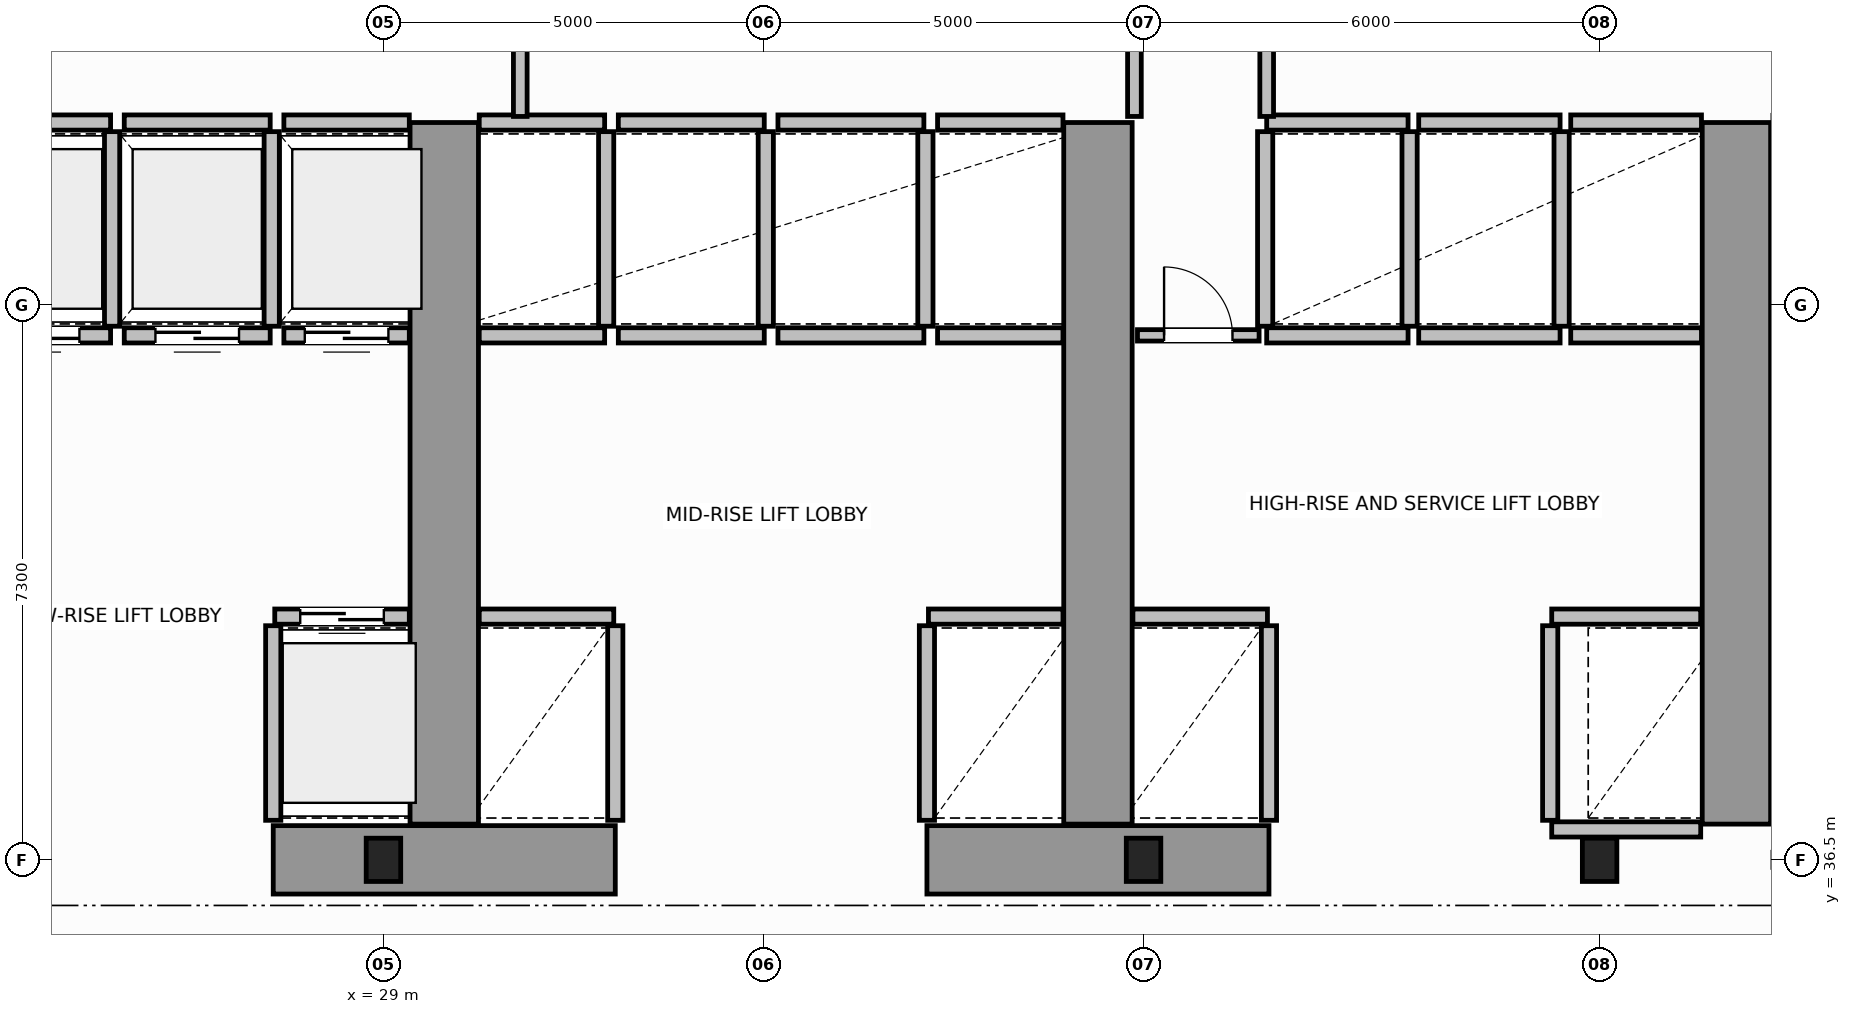
"""IFC4 building model, lengths in metres.
Left out: names, types, materials, properties, quantities, classifications, styles, units other than length and angle.
Written with IfcOpenShell. Run it as: python <this file> out.ifc"""

import sys

from ifc_helpers import new_model, si_unit, direction, frame, frame_2d, origin, origin_2d, place, context, subcontext, project, spatial, rectangle, i_section, extrude, source, transform, mapped, element, fill, save


model = new_model("IFC4")
c1 = context("Model", 3, precision=1e-05, world=origin(), true_north=direction((0.0, 1.0)))
c2 = subcontext(c1, "Body", "Model", "MODEL_VIEW")
j1 = project(units=[si_unit("LENGTHUNIT", "METRE"), si_unit("PLANEANGLEUNIT", "RADIAN")], contexts=[c1])
p1 = place(None, origin())
s1 = spatial("IfcSite", under=j1, at=p1, CompositionType="ELEMENT")
p2 = place(p1, origin())
s2 = spatial("IfcBuilding", under=s1, at=p2, CompositionType="ELEMENT")
p3 = place(p2, frame((0.0, 0.0, 60.6)))
s3 = spatial("IfcBuildingStorey", under=s2, at=p3, CompositionType="ELEMENT", Elevation=60.6)
m1 = source(origin(), c2, "Body", "SweptSolid", [
    extrude(i_section(OverallWidth=0.454, OverallDepth=0.569, WebThickness=0.078, FlangeThickness=0.08, FilletRadius=0.015, at=origin_2d()), origin(), (0.0, 0.0, 1.0), 3.8),
])
for number, where, z_axis, x_axis in (
    (1, (29.0, 36.5, 0.0), (0.0, 0.0, 1.0), (1.0, 0.0, 0.0)),
    (2, (39.0, 36.5, 0.0), (0.0, 0.0, 1.0), (1.0, 0.0, 0.0)),
    (3, (45.0, 36.5, 0.0), (0.0, 0.0, 1.0), (1.0, 0.0, 0.0)),
):
    element("IfcColumn", number, at=place(p3, frame(where, z_axis=z_axis, x_axis=x_axis)), inside=s3, PredefinedType="COLUMN", context=c2, shape_type="MappedRepresentation", body=[
        mapped(m1, transform((0.0, 0.0, 0.0), scale=1.0)),
    ])
for number, where, z_axis, x_axis in (
    (4, (27.55, 36.5, 0.0), (0.0, 0.0, 1.0), (1.0, 0.0, 0.0)),
    (5, (36.15, 36.5, 0.0), (0.0, 0.0, 1.0), (1.0, 0.0, 0.0)),
):
    element("IfcWall", number, at=place(p3, frame(where, z_axis=z_axis, x_axis=x_axis)), inside=s3, PredefinedType="SHEAR", context=c2, shape_type="SweptSolid", body=[
        extrude(rectangle(XDim=4.5, YDim=0.9, at=frame_2d((2.25, 0.0))), origin(), (0.0, 0.0, 1.0), 3.8),
    ])
for number, where, z_axis, x_axis in (
    (6, (29.8, 36.97, 0.0), (0.0, 0.0, 1.0), (0.0, 1.0, 0.0)),
    (7, (38.4, 36.97, 0.0), (0.0, 0.0, 1.0), (0.0, 1.0, 0.0)),
    (8, (46.8, 36.97, 0.0), (0.0, 0.0, 1.0), (0.0, 1.0, 0.0)),
):
    element("IfcWall", number, at=place(p3, frame(where, z_axis=z_axis, x_axis=x_axis)), inside=s3, PredefinedType="SHEAR", context=c2, shape_type="SweptSolid", body=[
        extrude(rectangle(XDim=9.23, YDim=0.9, at=frame_2d((4.615, 0.0))), origin(), (0.0, 0.0, 1.0), 3.8),
    ])
p4 = place(p3, frame((27.57, 39.7, 0.0), z_axis=(0.0, 0.0, 1.0), x_axis=(1.0, 0.0, 0.0)))
e9 = element("IfcWall", 9, at=p4, inside=s3, PredefinedType="SOLIDWALL", context=c2, shape_type="SweptSolid", body=[
    extrude(rectangle(XDim=1.77, YDim=0.2, at=frame_2d((0.885, 0.0))), origin(), (0.0, 0.0, 1.0), 3.58),
])
p5 = place(p4, frame((0.335, 0.0, 0.0)))
e10 = element("IfcOpeningElement", 10, at=p5, cuts=e9, PredefinedType="OPENING", context=c2, shape_type="SweptSolid", body=[
    extrude(rectangle(XDim=1.1, YDim=2.15, at=frame_2d((0.55, 1.075))), frame((0.0, 0.11, 0.0), z_axis=(0.0, -1.0, 0.0), x_axis=(1.0, 0.0, 0.0)), (0.0, 0.0, 1.0), 0.22),
])
p6 = place(p3, frame((27.55, 37.02, 0.0), z_axis=(0.0, 0.0, 1.0), x_axis=(0.0, 1.0, 0.0)))
e11 = element("IfcWall", 11, at=p6, inside=s3, PredefinedType="SOLIDWALL", context=c2, shape_type="SweptSolid", body=[
    extrude(rectangle(XDim=2.56, YDim=0.2, at=frame_2d((1.28, 0.0))), origin(), (0.0, 0.0, 1.0), 3.58),
])
p7 = place(p3, frame((23.49, 43.4, 0.0), z_axis=(0.0, 0.0, 1.0), x_axis=(1.0, 0.0, 0.0)))
e12 = element("IfcWall", 12, at=p7, inside=s3, PredefinedType="SOLIDWALL", context=c2, shape_type="SweptSolid", body=[
    extrude(rectangle(XDim=1.92, YDim=0.2, at=frame_2d((0.96, 0.0))), origin(), (0.0, 0.0, 1.0), 3.58),
])
p8 = place(p7, frame((0.41, 0.0, 0.0)))
e13 = element("IfcOpeningElement", 13, at=p8, cuts=e12, PredefinedType="OPENING", context=c2, shape_type="SweptSolid", body=[
    extrude(rectangle(XDim=1.1, YDim=2.15, at=frame_2d((0.55, 1.075))), frame((0.0, 0.11, 0.0), z_axis=(0.0, -1.0, 0.0), x_axis=(1.0, 0.0, 0.0)), (0.0, 0.0, 1.0), 0.22),
])
p9 = place(p3, frame((23.49, 46.2, 0.0), z_axis=(0.0, 0.0, 1.0), x_axis=(1.0, 0.0, 0.0)))
e14 = element("IfcWall", 14, at=p9, inside=s3, PredefinedType="SOLIDWALL", context=c2, shape_type="SweptSolid", body=[
    extrude(rectangle(XDim=1.92, YDim=0.2, at=frame_2d((0.96, 0.0))), origin(), (0.0, 0.0, 1.0), 3.58),
])
p10 = place(p3, frame((25.43, 43.52, 0.0), z_axis=(0.0, 0.0, 1.0), x_axis=(0.0, 1.0, 0.0)))
e15 = element("IfcWall", 15, at=p10, inside=s3, PredefinedType="SOLIDWALL", context=c2, shape_type="SweptSolid", body=[
    extrude(rectangle(XDim=2.56, YDim=0.2, at=frame_2d((1.28, 0.0))), origin(), (0.0, 0.0, 1.0), 3.58),
])
p11 = place(p3, frame((25.59, 43.4, 0.0), z_axis=(0.0, 0.0, 1.0), x_axis=(1.0, 0.0, 0.0)))
e16 = element("IfcWall", 16, at=p11, inside=s3, PredefinedType="SOLIDWALL", context=c2, shape_type="SweptSolid", body=[
    extrude(rectangle(XDim=1.92, YDim=0.2, at=frame_2d((0.96, 0.0))), origin(), (0.0, 0.0, 1.0), 3.58),
])
p12 = place(p11, frame((0.41, 0.0, 0.0)))
e17 = element("IfcOpeningElement", 17, at=p12, cuts=e16, PredefinedType="OPENING", context=c2, shape_type="SweptSolid", body=[
    extrude(rectangle(XDim=1.1, YDim=2.15, at=frame_2d((0.55, 1.075))), frame((0.0, 0.11, 0.0), z_axis=(0.0, -1.0, 0.0), x_axis=(1.0, 0.0, 0.0)), (0.0, 0.0, 1.0), 0.22),
])
p13 = place(p3, frame((25.59, 46.2, 0.0), z_axis=(0.0, 0.0, 1.0), x_axis=(1.0, 0.0, 0.0)))
e18 = element("IfcWall", 18, at=p13, inside=s3, PredefinedType="SOLIDWALL", context=c2, shape_type="SweptSolid", body=[
    extrude(rectangle(XDim=1.92, YDim=0.2, at=frame_2d((0.96, 0.0))), origin(), (0.0, 0.0, 1.0), 3.58),
])
p14 = place(p3, frame((27.53, 43.52, 0.0), z_axis=(0.0, 0.0, 1.0), x_axis=(0.0, 1.0, 0.0)))
e19 = element("IfcWall", 19, at=p14, inside=s3, PredefinedType="SOLIDWALL", context=c2, shape_type="SweptSolid", body=[
    extrude(rectangle(XDim=2.56, YDim=0.2, at=frame_2d((1.28, 0.0))), origin(), (0.0, 0.0, 1.0), 3.58),
])
p15 = place(p3, frame((27.69, 43.4, 0.0), z_axis=(0.0, 0.0, 1.0), x_axis=(1.0, 0.0, 0.0)))
e20 = element("IfcWall", 20, at=p15, inside=s3, PredefinedType="SOLIDWALL", context=c2, shape_type="SweptSolid", body=[
    extrude(rectangle(XDim=1.65, YDim=0.2, at=frame_2d((0.825, 0.0))), origin(), (0.0, 0.0, 1.0), 3.58),
])
p16 = place(p15, frame((0.275, 0.0, 0.0)))
e21 = element("IfcOpeningElement", 21, at=p16, cuts=e20, PredefinedType="OPENING", context=c2, shape_type="SweptSolid", body=[
    extrude(rectangle(XDim=1.1, YDim=2.15, at=frame_2d((0.55, 1.075))), frame((0.0, 0.11, 0.0), z_axis=(0.0, -1.0, 0.0), x_axis=(1.0, 0.0, 0.0)), (0.0, 0.0, 1.0), 0.22),
])
p17 = place(p3, frame((27.69, 46.2, 0.0), z_axis=(0.0, 0.0, 1.0), x_axis=(1.0, 0.0, 0.0)))
e22 = element("IfcWall", 22, at=p17, inside=s3, PredefinedType="SOLIDWALL", context=c2, shape_type="SweptSolid", body=[
    extrude(rectangle(XDim=1.65, YDim=0.2, at=frame_2d((0.825, 0.0))), origin(), (0.0, 0.0, 1.0), 3.58),
])
p18 = place(p3, frame((30.26, 39.7, 0.0), z_axis=(0.0, 0.0, 1.0), x_axis=(1.0, 0.0, 0.0)))
e23 = element("IfcWall", 23, at=p18, inside=s3, PredefinedType="SOLIDWALL", context=c2, shape_type="SweptSolid", body=[
    extrude(rectangle(XDim=1.77, YDim=0.2, at=frame_2d((0.885, 0.0))), origin(), (0.0, 0.0, 1.0), 3.58),
])
p19 = place(p3, frame((32.05, 37.02, 0.0), z_axis=(0.0, 0.0, 1.0), x_axis=(0.0, 1.0, 0.0)))
e24 = element("IfcWall", 24, at=p19, inside=s3, PredefinedType="SOLIDWALL", context=c2, shape_type="SweptSolid", body=[
    extrude(rectangle(XDim=2.56, YDim=0.2, at=frame_2d((1.28, 0.0))), origin(), (0.0, 0.0, 1.0), 3.58),
])
p20 = place(p3, frame((36.17, 39.7, 0.0), z_axis=(0.0, 0.0, 1.0), x_axis=(1.0, 0.0, 0.0)))
e25 = element("IfcWall", 25, at=p20, inside=s3, PredefinedType="SOLIDWALL", context=c2, shape_type="SweptSolid", body=[
    extrude(rectangle(XDim=1.77, YDim=0.2, at=frame_2d((0.885, 0.0))), origin(), (0.0, 0.0, 1.0), 3.58),
])
p21 = place(p3, frame((36.15, 37.02, 0.0), z_axis=(0.0, 0.0, 1.0), x_axis=(0.0, 1.0, 0.0)))
e26 = element("IfcWall", 26, at=p21, inside=s3, PredefinedType="SOLIDWALL", context=c2, shape_type="SweptSolid", body=[
    extrude(rectangle(XDim=2.56, YDim=0.2, at=frame_2d((1.28, 0.0))), origin(), (0.0, 0.0, 1.0), 3.58),
])
for number, where, z_axis, x_axis in (
    (27, (30.26, 43.4, 0.0), (0.0, 0.0, 1.0), (1.0, 0.0, 0.0)),
    (28, (30.26, 46.2, 0.0), (0.0, 0.0, 1.0), (1.0, 0.0, 0.0)),
):
    element("IfcWall", number, at=place(p3, frame(where, z_axis=z_axis, x_axis=x_axis)), inside=s3, PredefinedType="SOLIDWALL", context=c2, shape_type="SweptSolid", body=[
        extrude(rectangle(XDim=1.65, YDim=0.2, at=frame_2d((0.825, 0.0))), origin(), (0.0, 0.0, 1.0), 3.58),
    ])
p22 = place(p3, frame((31.93, 43.52, 0.0), z_axis=(0.0, 0.0, 1.0), x_axis=(0.0, 1.0, 0.0)))
e29 = element("IfcWall", 29, at=p22, inside=s3, PredefinedType="SOLIDWALL", context=c2, shape_type="SweptSolid", body=[
    extrude(rectangle(XDim=2.56, YDim=0.2, at=frame_2d((1.28, 0.0))), origin(), (0.0, 0.0, 1.0), 3.58),
])
for number, where, z_axis, x_axis in (
    (30, (32.09, 43.4, 0.0), (0.0, 0.0, 1.0), (1.0, 0.0, 0.0)),
    (31, (32.09, 46.2, 0.0), (0.0, 0.0, 1.0), (1.0, 0.0, 0.0)),
):
    element("IfcWall", number, at=place(p3, frame(where, z_axis=z_axis, x_axis=x_axis)), inside=s3, PredefinedType="SOLIDWALL", context=c2, shape_type="SweptSolid", body=[
        extrude(rectangle(XDim=1.92, YDim=0.2, at=frame_2d((0.96, 0.0))), origin(), (0.0, 0.0, 1.0), 3.58),
    ])
p23 = place(p3, frame((34.03, 43.52, 0.0), z_axis=(0.0, 0.0, 1.0), x_axis=(0.0, 1.0, 0.0)))
e32 = element("IfcWall", 32, at=p23, inside=s3, PredefinedType="SOLIDWALL", context=c2, shape_type="SweptSolid", body=[
    extrude(rectangle(XDim=2.56, YDim=0.2, at=frame_2d((1.28, 0.0))), origin(), (0.0, 0.0, 1.0), 3.58),
])
for number, where, z_axis, x_axis in (
    (33, (34.19, 43.4, 0.0), (0.0, 0.0, 1.0), (1.0, 0.0, 0.0)),
    (34, (34.19, 46.2, 0.0), (0.0, 0.0, 1.0), (1.0, 0.0, 0.0)),
):
    element("IfcWall", number, at=place(p3, frame(where, z_axis=z_axis, x_axis=x_axis)), inside=s3, PredefinedType="SOLIDWALL", context=c2, shape_type="SweptSolid", body=[
        extrude(rectangle(XDim=1.92, YDim=0.2, at=frame_2d((0.96, 0.0))), origin(), (0.0, 0.0, 1.0), 3.58),
    ])
p24 = place(p3, frame((36.13, 43.52, 0.0), z_axis=(0.0, 0.0, 1.0), x_axis=(0.0, 1.0, 0.0)))
e35 = element("IfcWall", 35, at=p24, inside=s3, PredefinedType="SOLIDWALL", context=c2, shape_type="SweptSolid", body=[
    extrude(rectangle(XDim=2.56, YDim=0.2, at=frame_2d((1.28, 0.0))), origin(), (0.0, 0.0, 1.0), 3.58),
])
for number, where, z_axis, x_axis in (
    (36, (36.29, 43.4, 0.0), (0.0, 0.0, 1.0), (1.0, 0.0, 0.0)),
    (37, (36.29, 46.2, 0.0), (0.0, 0.0, 1.0), (1.0, 0.0, 0.0)),
):
    element("IfcWall", number, at=place(p3, frame(where, z_axis=z_axis, x_axis=x_axis)), inside=s3, PredefinedType="SOLIDWALL", context=c2, shape_type="SweptSolid", body=[
        extrude(rectangle(XDim=1.65, YDim=0.2, at=frame_2d((0.825, 0.0))), origin(), (0.0, 0.0, 1.0), 3.58),
    ])
p25 = place(p3, frame((38.86, 39.7, 0.0), z_axis=(0.0, 0.0, 1.0), x_axis=(1.0, 0.0, 0.0)))
e38 = element("IfcWall", 38, at=p25, inside=s3, PredefinedType="SOLIDWALL", context=c2, shape_type="SweptSolid", body=[
    extrude(rectangle(XDim=1.77, YDim=0.2, at=frame_2d((0.885, 0.0))), origin(), (0.0, 0.0, 1.0), 3.58),
])
p26 = place(p3, frame((40.65, 37.02, 0.0), z_axis=(0.0, 0.0, 1.0), x_axis=(0.0, 1.0, 0.0)))
e39 = element("IfcWall", 39, at=p26, inside=s3, PredefinedType="SOLIDWALL", context=c2, shape_type="SweptSolid", body=[
    extrude(rectangle(XDim=2.56, YDim=0.2, at=frame_2d((1.28, 0.0))), origin(), (0.0, 0.0, 1.0), 3.58),
])
p27 = place(p3, frame((44.37, 39.7, 0.0), z_axis=(0.0, 0.0, 1.0), x_axis=(1.0, 0.0, 0.0)))
e40 = element("IfcWall", 40, at=p27, inside=s3, PredefinedType="SOLIDWALL", context=c2, shape_type="SweptSolid", body=[
    extrude(rectangle(XDim=1.96, YDim=0.2, at=frame_2d((0.98, 0.0))), origin(), (0.0, 0.0, 1.0), 3.58),
])
p28 = place(p3, frame((44.37, 36.9, 0.0), z_axis=(0.0, 0.0, 1.0), x_axis=(1.0, 0.0, 0.0)))
e41 = element("IfcWall", 41, at=p28, inside=s3, PredefinedType="SOLIDWALL", context=c2, shape_type="SweptSolid", body=[
    extrude(rectangle(XDim=1.96, YDim=0.2, at=frame_2d((0.98, 0.0))), origin(), (0.0, 0.0, 1.0), 2.37),
])
p29 = place(p3, frame((44.35, 37.02, 0.0), z_axis=(0.0, 0.0, 1.0), x_axis=(0.0, 1.0, 0.0)))
e42 = element("IfcWall", 42, at=p29, inside=s3, PredefinedType="SOLIDWALL", context=c2, shape_type="SweptSolid", body=[
    extrude(rectangle(XDim=2.56, YDim=0.2, at=frame_2d((1.28, 0.0))), origin(), (0.0, 0.0, 1.0), 3.58),
])
for number, where, z_axis, x_axis in (
    (43, (40.62, 43.4, 0.0), (0.0, 0.0, 1.0), (1.0, 0.0, 0.0)),
    (44, (40.62, 46.2, 0.0), (0.0, 0.0, 1.0), (1.0, 0.0, 0.0)),
):
    element("IfcWall", number, at=place(p3, frame(where, z_axis=z_axis, x_axis=x_axis)), inside=s3, PredefinedType="SOLIDWALL", context=c2, shape_type="SweptSolid", body=[
        extrude(rectangle(XDim=1.86, YDim=0.2, at=frame_2d((0.93, 0.0))), origin(), (0.0, 0.0, 1.0), 3.58),
    ])
for number, where, z_axis, x_axis in (
    (45, (40.6, 43.52, 0.0), (0.0, 0.0, 1.0), (0.0, 1.0, 0.0)),
    (46, (42.5, 43.52, 0.0), (0.0, 0.0, 1.0), (0.0, 1.0, 0.0)),
):
    element("IfcWall", number, at=place(p3, frame(where, z_axis=z_axis, x_axis=x_axis)), inside=s3, PredefinedType="SOLIDWALL", context=c2, shape_type="SweptSolid", body=[
        extrude(rectangle(XDim=2.56, YDim=0.2, at=frame_2d((1.28, 0.0))), origin(), (0.0, 0.0, 1.0), 3.58),
    ])
for number, where, z_axis, x_axis in (
    (47, (42.62, 43.4, 0.0), (0.0, 0.0, 1.0), (1.0, 0.0, 0.0)),
    (48, (42.62, 46.2, 0.0), (0.0, 0.0, 1.0), (1.0, 0.0, 0.0)),
):
    element("IfcWall", number, at=place(p3, frame(where, z_axis=z_axis, x_axis=x_axis)), inside=s3, PredefinedType="SOLIDWALL", context=c2, shape_type="SweptSolid", body=[
        extrude(rectangle(XDim=1.86, YDim=0.2, at=frame_2d((0.93, 0.0))), origin(), (0.0, 0.0, 1.0), 3.58),
    ])
p30 = place(p3, frame((44.5, 43.52, 0.0), z_axis=(0.0, 0.0, 1.0), x_axis=(0.0, 1.0, 0.0)))
e49 = element("IfcWall", 49, at=p30, inside=s3, PredefinedType="SOLIDWALL", context=c2, shape_type="SweptSolid", body=[
    extrude(rectangle(XDim=2.56, YDim=0.2, at=frame_2d((1.28, 0.0))), origin(), (0.0, 0.0, 1.0), 3.58),
])
for number, where, z_axis, x_axis in (
    (50, (44.62, 43.4, 0.0), (0.0, 0.0, 1.0), (1.0, 0.0, 0.0)),
    (51, (44.62, 46.2, 0.0), (0.0, 0.0, 1.0), (1.0, 0.0, 0.0)),
):
    element("IfcWall", number, at=place(p3, frame(where, z_axis=z_axis, x_axis=x_axis)), inside=s3, PredefinedType="SOLIDWALL", context=c2, shape_type="SweptSolid", body=[
        extrude(rectangle(XDim=1.72, YDim=0.2, at=frame_2d((0.86, 0.0))), origin(), (0.0, 0.0, 1.0), 3.58),
    ])
p31 = place(p3, frame((47.26, 39.95, 0.0), z_axis=(0.0, 0.0, 1.0), x_axis=(1.0, 0.0, 0.0)))
e52 = element("IfcWall", 52, at=p31, inside=s3, PredefinedType="SOLIDWALL", context=c2, shape_type="SweptSolid", body=[
    extrude(rectangle(XDim=2.07, YDim=0.2, at=frame_2d((1.035, 0.0))), origin(), (0.0, 0.0, 1.0), 3.58),
])
p32 = place(p31, frame((0.485, 0.0, 0.0)))
e53 = element("IfcOpeningElement", 53, at=p32, cuts=e52, PredefinedType="OPENING", context=c2, shape_type="SweptSolid", body=[
    extrude(rectangle(XDim=1.1, YDim=2.15, at=frame_2d((0.55, 1.075))), frame((0.0, 0.11, 0.0), z_axis=(0.0, -1.0, 0.0), x_axis=(1.0, 0.0, 0.0)), (0.0, 0.0, 1.0), 0.22),
])
p33 = place(p3, frame((47.26, 42.75, 0.0), z_axis=(0.0, 0.0, 1.0), x_axis=(1.0, 0.0, 0.0)))
e54 = element("IfcWall", 54, at=p33, inside=s3, PredefinedType="SOLIDWALL", context=c2, shape_type="SweptSolid", body=[
    extrude(rectangle(XDim=2.07, YDim=0.2, at=frame_2d((1.035, 0.0))), origin(), (0.0, 0.0, 1.0), 3.58),
])
p34 = place(p3, frame((38.92, 43.4, 0.0), z_axis=(0.0, 0.0, 1.0), x_axis=(1.0, 0.0, 0.0)))
e55 = element("IfcWall", 55, at=p34, inside=s3, PredefinedType="PARTITIONING", context=c2, shape_type="SweptSolid", body=[
    extrude(rectangle(XDim=1.6, YDim=0.15, at=frame_2d((0.8, 0.0))), origin(), (0.0, 0.0, 1.0), 3.58),
])
p35 = place(p34, frame((0.35, 0.0, 0.0)))
e56 = element("IfcOpeningElement", 56, at=p35, cuts=e55, PredefinedType="OPENING", context=c2, shape_type="SweptSolid", body=[
    extrude(rectangle(XDim=0.9, YDim=2.1, at=frame_2d((0.45, 1.05))), frame((0.0, 0.085, 0.0), z_axis=(0.0, -1.0, 0.0), x_axis=(1.0, 0.0, 0.0)), (0.0, 0.0, 1.0), 0.17),
])
for number, where, z_axis, x_axis in (
    (57, (30.8, 46.28, 0.0), (0.0, 0.0, 1.0), (0.0, 1.0, 0.0)),
    (58, (38.88, 46.28, 0.0), (0.0, 0.0, 1.0), (0.0, 1.0, 0.0)),
):
    element("IfcWall", number, at=place(p3, frame(where, z_axis=z_axis, x_axis=x_axis)), inside=s3, PredefinedType="PLUMBINGWALL", context=c2, shape_type="SweptSolid", body=[
        extrude(rectangle(XDim=1.94, YDim=0.18, at=frame_2d((0.97, 0.0))), origin(), (0.0, 0.0, 1.0), 3.58),
    ])
p36 = place(p3, frame((40.62, 46.28, 0.0), z_axis=(0.0, 0.0, 1.0), x_axis=(0.0, 1.0, 0.0)))
e59 = element("IfcWall", 59, at=p36, inside=s3, PredefinedType="PLUMBINGWALL", context=c2, shape_type="SweptSolid", body=[
    extrude(rectangle(XDim=2.0, YDim=0.18, at=frame_2d((1.0, 0.0))), origin(), (0.0, 0.0, 1.0), 3.58),
])
m2 = source(origin(), c2, "Body", "SweptSolid", [
    extrude(rectangle(XDim=1.1, YDim=2.15, at=frame_2d((0.55, 1.075))), frame((0.0, 0.025, 0.0), z_axis=(0.0, -1.0, 0.0), x_axis=(1.0, 0.0, 0.0)), (0.0, 0.0, 1.0), 0.05),
])
p37 = place(p5, origin())
e60 = element("IfcDoor", 60, at=p37, inside=s3, OperationType="DOUBLE_DOOR_SLIDING", PredefinedType="DOOR", context=c2, shape_type="MappedRepresentation", body=[
    mapped(m2, transform((0.0, 0.0, 0.0), scale=1.0)),
])
fill(e10, e60)
p38 = place(p8, origin())
e61 = element("IfcDoor", 61, at=p38, inside=s3, OperationType="DOUBLE_DOOR_SLIDING", PredefinedType="DOOR", context=c2, shape_type="MappedRepresentation", body=[
    mapped(m2, transform((0.0, 0.0, 0.0), scale=1.0)),
])
fill(e13, e61)
p39 = place(p12, origin())
e62 = element("IfcDoor", 62, at=p39, inside=s3, OperationType="DOUBLE_DOOR_SLIDING", PredefinedType="DOOR", context=c2, shape_type="MappedRepresentation", body=[
    mapped(m2, transform((0.0, 0.0, 0.0), scale=1.0)),
])
fill(e17, e62)
p40 = place(p16, origin())
e63 = element("IfcDoor", 63, at=p40, inside=s3, OperationType="DOUBLE_DOOR_SLIDING", PredefinedType="DOOR", context=c2, shape_type="MappedRepresentation", body=[
    mapped(m2, transform((0.0, 0.0, 0.0), scale=1.0)),
])
fill(e21, e63)
m3 = source(origin(), c2, "Body", "SweptSolid", [
    extrude(rectangle(XDim=0.9, YDim=2.1, at=frame_2d((0.45, 1.05))), frame((0.0, 0.025, 0.0), z_axis=(0.0, -1.0, 0.0), x_axis=(1.0, 0.0, 0.0)), (0.0, 0.0, 1.0), 0.05),
])
p41 = place(p35, origin())
e64 = element("IfcDoor", 64, at=p41, inside=s3, OperationType="SINGLE_SWING_LEFT", PredefinedType="DOOR", context=c2, shape_type="MappedRepresentation", body=[
    mapped(m3, transform((0.0, 0.0, 0.0), scale=1.0)),
])
fill(e56, e64)
save(model, sys.argv[1])
